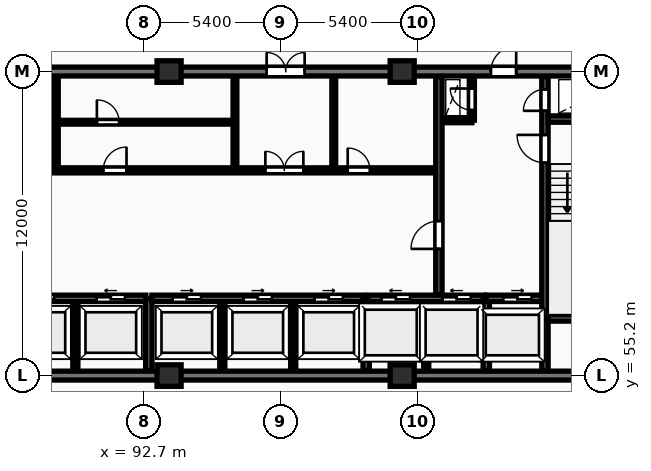
"""IFC4 building model, lengths in metres.
Left out: names, types, materials, properties, quantities, classifications, styles, units other than length and angle.
Written with IfcOpenShell. Run it as: python <this file> out.ifc"""

import sys

from ifc_helpers import new_model, si_unit, direction, frame, frame_2d, origin, origin_2d, place, context, subcontext, project, spatial, rectangle, extrude, element, fill, save


model = new_model("IFC4")
c1 = context("Model", 3, precision=1e-05, world=origin(), true_north=direction((0.0, 1.0)))
c2 = subcontext(c1, "Body", "Model", "MODEL_VIEW")
j1 = project(units=[si_unit("LENGTHUNIT", "METRE"), si_unit("PLANEANGLEUNIT", "RADIAN")], contexts=[c1])
p1 = place(None, origin())
s1 = spatial("IfcSite", under=j1, at=p1, CompositionType="ELEMENT")
p2 = place(p1, origin())
s2 = spatial("IfcBuilding", under=s1, at=p2, CompositionType="ELEMENT")
p3 = place(p2, frame((0.0, 0.0, 93.8)))
s3 = spatial("IfcBuildingStorey", under=s2, at=p3, CompositionType="ELEMENT", Elevation=93.8)
for number, where, z_axis, x_axis in (
    (1, (93.7, 55.2, 0.0), (0.0, 0.0, 1.0), (1.0, 0.0, 0.0)),
    (2, (93.7, 67.2, 0.0), (0.0, 0.0, 1.0), (1.0, 0.0, 0.0)),
    (3, (102.9, 55.2, 0.0), (0.0, 0.0, 1.0), (1.0, 0.0, 0.0)),
    (4, (102.9, 67.2, 0.0), (0.0, 0.0, 1.0), (1.0, 0.0, 0.0)),
):
    element("IfcColumn", number, at=place(p3, frame(where, z_axis=z_axis, x_axis=x_axis)), inside=s3, PredefinedType="COLUMN", context=c2, shape_type="SweptSolid", body=[
        extrude(rectangle(XDim=0.95, YDim=0.85, at=origin_2d()), origin(), (0.0, 0.0, 1.0), 3.25),
    ])
p4 = place(p3, frame((75.95, 55.2, 0.0), z_axis=(0.0, 0.0, 1.0), x_axis=(1.0, 0.0, 0.0)))
e5 = element("IfcWall", 5, at=p4, inside=s3, PredefinedType="SHEAR", context=c2, shape_type="SweptSolid", body=[
    extrude(rectangle(XDim=36.3, YDim=0.35, at=frame_2d((18.15, 0.0))), origin(), (0.0, 0.0, 1.0), 3.25),
])
p5 = place(p3, frame((75.95, 67.2, 0.0), z_axis=(0.0, 0.0, 1.0), x_axis=(1.0, 0.0, 0.0)))
e6 = element("IfcWall", 6, at=p5, inside=s3, PredefinedType="SHEAR", context=c2, shape_type="SweptSolid", body=[
    extrude(rectangle(XDim=36.3, YDim=0.35, at=frame_2d((18.15, 0.0))), origin(), (0.0, 0.0, 1.0), 3.25),
])
p6 = place(p5, frame((5.25, 0.0, 0.0)))
e7 = element("IfcOpeningElement", 7, at=p6, cuts=e6, PredefinedType="OPENING", context=c2, shape_type="SweptSolid", body=[
    extrude(rectangle(XDim=1.0, YDim=2.15, at=frame_2d((0.5, 1.075))), frame((0.0, 0.185, 0.0), z_axis=(0.0, -1.0, 0.0), x_axis=(1.0, 0.0, 0.0)), (0.0, 0.0, 1.0), 0.37),
])
p7 = place(p5, frame((21.6, 0.0, 0.0)))
e8 = element("IfcOpeningElement", 8, at=p7, cuts=e6, PredefinedType="OPENING", context=c2, shape_type="SweptSolid", body=[
    extrude(rectangle(XDim=1.5, YDim=2.2, at=frame_2d((0.75, 1.1))), frame((0.0, 0.185, 0.0), z_axis=(0.0, -1.0, 0.0), x_axis=(1.0, 0.0, 0.0)), (0.0, 0.0, 1.0), 0.37),
])
p8 = place(p5, frame((30.45, 0.0, 0.0)))
e9 = element("IfcOpeningElement", 9, at=p8, cuts=e6, PredefinedType="OPENING", context=c2, shape_type="SweptSolid", body=[
    extrude(rectangle(XDim=1.0, YDim=2.15, at=frame_2d((0.5, 1.075))), frame((0.0, 0.185, 0.0), z_axis=(0.0, -1.0, 0.0), x_axis=(1.0, 0.0, 0.0)), (0.0, 0.0, 1.0), 0.37),
])
p9 = place(p3, frame((90.0, 55.4, 0.0), z_axis=(0.0, 0.0, 1.0), x_axis=(0.0, 1.0, 0.0)))
e10 = element("IfcWall", 10, at=p9, inside=s3, PredefinedType="PARTITIONING", context=c2, shape_type="SweptSolid", body=[
    extrude(rectangle(XDim=2.72, YDim=0.2, at=frame_2d((1.36, 0.0))), origin(), (0.0, 0.0, 1.0), 2.97),
])
p10 = place(p3, frame((84.42, 58.25, 0.0), z_axis=(0.0, 0.0, 1.0), x_axis=(1.0, 0.0, 0.0)))
e11 = element("IfcWall", 11, at=p10, inside=s3, PredefinedType="SHEAR", context=c2, shape_type="SweptSolid", body=[
    extrude(rectangle(XDim=8.36, YDim=0.25, at=frame_2d((4.18, 0.0))), origin(), (0.0, 0.0, 1.0), 3.25),
])
p11 = place(p10, frame((0.82, 0.0, 0.0)))
e12 = element("IfcOpeningElement", 12, at=p11, cuts=e11, PredefinedType="OPENING", context=c2, shape_type="SweptSolid", body=[
    extrude(rectangle(XDim=1.12, YDim=2.12, at=frame_2d((0.56, 1.06))), frame((0.0, 0.135, 0.0), z_axis=(0.0, -1.0, 0.0), x_axis=(1.0, 0.0, 0.0)), (0.0, 0.0, 1.0), 0.27),
])
p12 = place(p10, frame((3.62, 0.0, 0.0)))
e13 = element("IfcOpeningElement", 13, at=p12, cuts=e11, PredefinedType="OPENING", context=c2, shape_type="SweptSolid", body=[
    extrude(rectangle(XDim=1.12, YDim=2.12, at=frame_2d((0.56, 1.06))), frame((0.0, 0.135, 0.0), z_axis=(0.0, -1.0, 0.0), x_axis=(1.0, 0.0, 0.0)), (0.0, 0.0, 1.0), 0.27),
])
p13 = place(p10, frame((6.42, 0.0, 0.0)))
e14 = element("IfcOpeningElement", 14, at=p13, cuts=e11, PredefinedType="OPENING", context=c2, shape_type="SweptSolid", body=[
    extrude(rectangle(XDim=1.12, YDim=2.12, at=frame_2d((0.56, 1.06))), frame((0.0, 0.135, 0.0), z_axis=(0.0, -1.0, 0.0), x_axis=(1.0, 0.0, 0.0)), (0.0, 0.0, 1.0), 0.27),
])
p14 = place(p3, frame((92.9, 55.4, 0.0), z_axis=(0.0, 0.0, 1.0), x_axis=(0.0, 1.0, 0.0)))
e15 = element("IfcWall", 15, at=p14, inside=s3, PredefinedType="SHEAR", context=c2, shape_type="SweptSolid", body=[
    extrude(rectangle(XDim=2.85, YDim=0.25, at=frame_2d((1.425, 0.0))), origin(), (0.0, 0.0, 1.0), 3.25),
])
for number, where, z_axis, x_axis in (
    (16, (95.8, 55.4, 0.0), (0.0, 0.0, 1.0), (0.0, 1.0, 0.0)),
    (17, (98.6, 55.4, 0.0), (0.0, 0.0, 1.0), (0.0, 1.0, 0.0)),
):
    element("IfcWall", number, at=place(p3, frame(where, z_axis=z_axis, x_axis=x_axis)), inside=s3, PredefinedType="PARTITIONING", context=c2, shape_type="SweptSolid", body=[
        extrude(rectangle(XDim=2.72, YDim=0.2, at=frame_2d((1.36, 0.0))), origin(), (0.0, 0.0, 1.0), 2.97),
    ])
p15 = place(p3, frame((93.02, 58.25, 0.0), z_axis=(0.0, 0.0, 1.0), x_axis=(1.0, 0.0, 0.0)))
e18 = element("IfcWall", 18, at=p15, inside=s3, PredefinedType="SHEAR", context=c2, shape_type="SweptSolid", body=[
    extrude(rectangle(XDim=8.36, YDim=0.25, at=frame_2d((4.18, 0.0))), origin(), (0.0, 0.0, 1.0), 3.25),
])
p16 = place(p15, frame((0.82, 0.0, 0.0)))
e19 = element("IfcOpeningElement", 19, at=p16, cuts=e18, PredefinedType="OPENING", context=c2, shape_type="SweptSolid", body=[
    extrude(rectangle(XDim=1.12, YDim=2.12, at=frame_2d((0.56, 1.06))), frame((0.0, 0.135, 0.0), z_axis=(0.0, -1.0, 0.0), x_axis=(1.0, 0.0, 0.0)), (0.0, 0.0, 1.0), 0.27),
])
p17 = place(p15, frame((3.62, 0.0, 0.0)))
e20 = element("IfcOpeningElement", 20, at=p17, cuts=e18, PredefinedType="OPENING", context=c2, shape_type="SweptSolid", body=[
    extrude(rectangle(XDim=1.12, YDim=2.12, at=frame_2d((0.56, 1.06))), frame((0.0, 0.135, 0.0), z_axis=(0.0, -1.0, 0.0), x_axis=(1.0, 0.0, 0.0)), (0.0, 0.0, 1.0), 0.27),
])
p18 = place(p15, frame((6.42, 0.0, 0.0)))
e21 = element("IfcOpeningElement", 21, at=p18, cuts=e18, PredefinedType="OPENING", context=c2, shape_type="SweptSolid", body=[
    extrude(rectangle(XDim=1.12, YDim=2.12, at=frame_2d((0.56, 1.06))), frame((0.0, 0.135, 0.0), z_axis=(0.0, -1.0, 0.0), x_axis=(1.0, 0.0, 0.0)), (0.0, 0.0, 1.0), 0.27),
])
p19 = place(p3, frame((101.48, 55.4, 0.0), z_axis=(0.0, 0.0, 1.0), x_axis=(0.0, 1.0, 0.0)))
e22 = element("IfcWall", 22, at=p19, inside=s3, PredefinedType="SHEAR", context=c2, shape_type="SweptSolid", body=[
    extrude(rectangle(XDim=2.85, YDim=0.25, at=frame_2d((1.425, 0.0))), origin(), (0.0, 0.0, 1.0), 3.25),
])
p20 = place(p3, frame((103.85, 55.4, 0.0), z_axis=(0.0, 0.0, 1.0), x_axis=(0.0, 1.0, 0.0)))
e23 = element("IfcWall", 23, at=p20, inside=s3, PredefinedType="PARTITIONING", context=c2, shape_type="SweptSolid", body=[
    extrude(rectangle(XDim=2.72, YDim=0.2, at=frame_2d((1.36, 0.0))), origin(), (0.0, 0.0, 1.0), 2.97),
])
p21 = place(p3, frame((101.55, 58.25, 0.0), z_axis=(0.0, 0.0, 1.0), x_axis=(1.0, 0.0, 0.0)))
e24 = element("IfcWall", 24, at=p21, inside=s3, PredefinedType="SHEAR", context=c2, shape_type="SweptSolid", body=[
    extrude(rectangle(XDim=4.6, YDim=0.25, at=frame_2d((2.3, 0.0))), origin(), (0.0, 0.0, 1.0), 3.25),
])
p22 = place(p21, frame((0.54, 0.0, 0.0)))
e25 = element("IfcOpeningElement", 25, at=p22, cuts=e24, PredefinedType="OPENING", context=c2, shape_type="SweptSolid", body=[
    extrude(rectangle(XDim=1.12, YDim=2.12, at=frame_2d((0.56, 1.06))), frame((0.0, 0.135, 0.0), z_axis=(0.0, -1.0, 0.0), x_axis=(1.0, 0.0, 0.0)), (0.0, 0.0, 1.0), 0.27),
])
p23 = place(p21, frame((2.94, 0.0, 0.0)))
e26 = element("IfcOpeningElement", 26, at=p23, cuts=e24, PredefinedType="OPENING", context=c2, shape_type="SweptSolid", body=[
    extrude(rectangle(XDim=1.12, YDim=2.12, at=frame_2d((0.56, 1.06))), frame((0.0, 0.135, 0.0), z_axis=(0.0, -1.0, 0.0), x_axis=(1.0, 0.0, 0.0)), (0.0, 0.0, 1.0), 0.27),
])
p24 = place(p3, frame((106.22, 55.4, 0.0), z_axis=(0.0, 0.0, 1.0), x_axis=(0.0, 1.0, 0.0)))
e27 = element("IfcWall", 27, at=p24, inside=s3, PredefinedType="SHEAR", context=c2, shape_type="SweptSolid", body=[
    extrude(rectangle(XDim=2.85, YDim=0.25, at=frame_2d((1.425, 0.0))), origin(), (0.0, 0.0, 1.0), 3.25),
])
p25 = place(p3, frame((106.22, 58.25, 0.0), z_axis=(0.0, 0.0, 1.0), x_axis=(1.0, 0.0, 0.0)))
e28 = element("IfcWall", 28, at=p25, inside=s3, PredefinedType="SHEAR", context=c2, shape_type="SweptSolid", body=[
    extrude(rectangle(XDim=2.46, YDim=0.25, at=frame_2d((1.23, 0.0))), origin(), (0.0, 0.0, 1.0), 3.25),
])
p26 = place(p25, frame((0.67, 0.0, 0.0)))
e29 = element("IfcOpeningElement", 29, at=p26, cuts=e28, PredefinedType="OPENING", context=c2, shape_type="SweptSolid", body=[
    extrude(rectangle(XDim=1.12, YDim=2.12, at=frame_2d((0.56, 1.06))), frame((0.0, 0.135, 0.0), z_axis=(0.0, -1.0, 0.0), x_axis=(1.0, 0.0, 0.0)), (0.0, 0.0, 1.0), 0.27),
])
p27 = place(p3, frame((89.25, 63.4, 0.0), z_axis=(0.0, 0.0, 1.0), x_axis=(0.0, 1.0, 0.0)))
e30 = element("IfcWall", 30, at=p27, inside=s3, PredefinedType="PARTITIONING", context=c2, shape_type="SweptSolid", body=[
    extrude(rectangle(XDim=3.6, YDim=0.15, at=frame_2d((1.8, 0.0))), origin(), (0.0, 0.0, 1.0), 2.97),
])
p28 = place(p3, frame((89.25, 65.2, 0.0), z_axis=(0.0, 0.0, 1.0), x_axis=(1.0, 0.0, 0.0)))
e31 = element("IfcWall", 31, at=p28, inside=s3, PredefinedType="PARTITIONING", context=c2, shape_type="SweptSolid", body=[
    extrude(rectangle(XDim=7.05, YDim=0.15, at=frame_2d((3.525, 0.0))), origin(), (0.0, 0.0, 1.0), 2.97),
])
p29 = place(p28, frame((1.6, 0.0, 0.0)))
e32 = element("IfcOpeningElement", 32, at=p29, cuts=e31, PredefinedType="OPENING", context=c2, shape_type="SweptSolid", body=[
    extrude(rectangle(XDim=0.88, YDim=2.06, at=frame_2d((0.44, 1.03))), frame((0.0, 0.085, 0.0), z_axis=(0.0, -1.0, 0.0), x_axis=(1.0, 0.0, 0.0)), (0.0, 0.0, 1.0), 0.17),
])
for number, where, z_axis, x_axis in (
    (33, (96.3, 63.4, 0.0), (0.0, 0.0, 1.0), (0.0, 1.0, 0.0)),
    (34, (100.2, 63.4, 0.0), (0.0, 0.0, 1.0), (0.0, 1.0, 0.0)),
):
    element("IfcWall", number, at=place(p3, frame(where, z_axis=z_axis, x_axis=x_axis)), inside=s3, PredefinedType="PARTITIONING", context=c2, shape_type="SweptSolid", body=[
        extrude(rectangle(XDim=3.6, YDim=0.15, at=frame_2d((1.8, 0.0))), origin(), (0.0, 0.0, 1.0), 2.97),
    ])
p30 = place(p3, frame((84.42, 63.3, 0.0), z_axis=(0.0, 0.0, 1.0), x_axis=(1.0, 0.0, 0.0)))
e35 = element("IfcWall", 35, at=p30, inside=s3, PredefinedType="PARTITIONING", context=c2, shape_type="SweptSolid", body=[
    extrude(rectangle(XDim=19.83, YDim=0.2, at=frame_2d((9.915, 0.0))), origin(), (0.0, 0.0, 1.0), 2.97),
])
p31 = place(p30, frame((1.15, 0.0, 0.0)))
e36 = element("IfcOpeningElement", 36, at=p31, cuts=e35, PredefinedType="OPENING", context=c2, shape_type="SweptSolid", body=[
    extrude(rectangle(XDim=0.85, YDim=2.05, at=frame_2d((0.425, 1.025))), frame((0.0, 0.11, 0.0), z_axis=(0.0, -1.0, 0.0), x_axis=(1.0, 0.0, 0.0)), (0.0, 0.0, 1.0), 0.22),
])
p32 = place(p30, frame((3.25, 0.0, 0.0)))
e37 = element("IfcOpeningElement", 37, at=p32, cuts=e35, PredefinedType="OPENING", context=c2, shape_type="SweptSolid", body=[
    extrude(rectangle(XDim=0.85, YDim=2.05, at=frame_2d((0.425, 1.025))), frame((0.0, 0.11, 0.0), z_axis=(0.0, -1.0, 0.0), x_axis=(1.0, 0.0, 0.0)), (0.0, 0.0, 1.0), 0.22),
])
p33 = place(p30, frame((13.08, 0.0, 0.0)))
e38 = element("IfcOpeningElement", 38, at=p33, cuts=e35, PredefinedType="OPENING", context=c2, shape_type="SweptSolid", body=[
    extrude(rectangle(XDim=1.5, YDim=2.2, at=frame_2d((0.75, 1.1))), frame((0.0, 0.11, 0.0), z_axis=(0.0, -1.0, 0.0), x_axis=(1.0, 0.0, 0.0)), (0.0, 0.0, 1.0), 0.22),
])
p34 = place(p30, frame((6.68, 0.0, 0.0)))
e39 = element("IfcOpeningElement", 39, at=p34, cuts=e35, PredefinedType="OPENING", context=c2, shape_type="SweptSolid", body=[
    extrude(rectangle(XDim=0.92, YDim=2.08, at=frame_2d((0.46, 1.04))), frame((0.0, 0.11, 0.0), z_axis=(0.0, -1.0, 0.0), x_axis=(1.0, 0.0, 0.0)), (0.0, 0.0, 1.0), 0.22),
])
p35 = place(p30, frame((16.33, 0.0, 0.0)))
e40 = element("IfcOpeningElement", 40, at=p35, cuts=e35, PredefinedType="OPENING", context=c2, shape_type="SweptSolid", body=[
    extrude(rectangle(XDim=0.88, YDim=2.06, at=frame_2d((0.44, 1.03))), frame((0.0, 0.11, 0.0), z_axis=(0.0, -1.0, 0.0), x_axis=(1.0, 0.0, 0.0)), (0.0, 0.0, 1.0), 0.22),
])
p36 = place(p3, frame((104.45, 65.28, 0.0), z_axis=(0.0, 0.0, 1.0), x_axis=(1.0, 0.0, 0.0)))
e41 = element("IfcWall", 41, at=p36, inside=s3, PredefinedType="PARTITIONING", context=c2, shape_type="SweptSolid", body=[
    extrude(rectangle(XDim=1.2, YDim=0.2, at=frame_2d((0.6, 0.0))), origin(), (0.0, 0.0, 1.0), 2.97),
])
p37 = place(p3, frame((105.65, 65.28, 0.0), z_axis=(0.0, 0.0, 1.0), x_axis=(0.0, 1.0, 0.0)))
e42 = element("IfcWall", 42, at=p37, inside=s3, PredefinedType="PARTITIONING", context=c2, shape_type="SweptSolid", body=[
    extrude(rectangle(XDim=1.72, YDim=0.2, at=frame_2d((0.86, 0.0))), origin(), (0.0, 0.0, 1.0), 2.97),
])
p38 = place(p37, frame((0.4, 0.0, 0.0)))
e43 = element("IfcOpeningElement", 43, at=p38, cuts=e42, PredefinedType="OPENING", context=c2, shape_type="SweptSolid", body=[
    extrude(rectangle(XDim=0.85, YDim=2.05, at=frame_2d((0.425, 1.025))), frame((0.0, 0.11, 0.0), z_axis=(0.0, -1.0, 0.0), x_axis=(1.0, 0.0, 0.0)), (0.0, 0.0, 1.0), 0.22),
])
p39 = place(p3, frame((104.35, 58.4, 0.0), z_axis=(0.0, 0.0, 1.0), x_axis=(0.0, 1.0, 0.0)))
e44 = element("IfcWall", 44, at=p39, inside=s3, PredefinedType="SHEAR", context=c2, shape_type="SweptSolid", body=[
    extrude(rectangle(XDim=8.6, YDim=0.25, at=frame_2d((4.3, 0.0))), origin(), (0.0, 0.0, 1.0), 3.25),
])
p40 = place(p39, frame((1.8, 0.0, 0.0)))
e45 = element("IfcOpeningElement", 45, at=p40, cuts=e44, PredefinedType="OPENING", context=c2, shape_type="SweptSolid", body=[
    extrude(rectangle(XDim=1.1, YDim=2.1, at=frame_2d((0.55, 1.05))), frame((0.0, 0.135, 0.0), z_axis=(0.0, -1.0, 0.0), x_axis=(1.0, 0.0, 0.0)), (0.0, 0.0, 1.0), 0.27),
])
p41 = place(p3, frame((108.535, 55.4, 0.0), z_axis=(0.0, 0.0, 1.0), x_axis=(0.0, 1.0, 0.0)))
e46 = element("IfcWall", 46, at=p41, inside=s3, PredefinedType="SHEAR", context=c2, shape_type="SweptSolid", body=[
    extrude(rectangle(XDim=11.6, YDim=0.25, at=frame_2d((5.8, 0.0))), origin(), (0.0, 0.0, 1.0), 3.25),
])
p42 = place(p41, frame((8.2, 0.0, 0.0)))
e47 = element("IfcOpeningElement", 47, at=p42, cuts=e46, PredefinedType="OPENING", context=c2, shape_type="SweptSolid", body=[
    extrude(rectangle(XDim=1.1, YDim=2.1, at=frame_2d((0.55, 1.05))), frame((0.0, 0.135, 0.0), z_axis=(0.0, -1.0, 0.0), x_axis=(1.0, 0.0, 0.0)), (0.0, 0.0, 1.0), 0.27),
])
p43 = place(p41, frame((10.25, 0.0, 0.0)))
e48 = element("IfcOpeningElement", 48, at=p43, cuts=e46, PredefinedType="OPENING", context=c2, shape_type="SweptSolid", body=[
    extrude(rectangle(XDim=0.85, YDim=2.05, at=frame_2d((0.425, 1.025))), frame((0.0, 0.135, 0.0), z_axis=(0.0, -1.0, 0.0), x_axis=(1.0, 0.0, 0.0)), (0.0, 0.0, 1.0), 0.27),
])
for number, where, z_axis, x_axis in (
    (49, (108.66, 57.475, 0.0), (0.0, 0.0, 1.0), (1.0, 0.0, 0.0)),
    (50, (108.66, 65.325, 0.0), (0.0, 0.0, 1.0), (1.0, 0.0, 0.0)),
):
    element("IfcWall", number, at=place(p3, frame(where, z_axis=z_axis, x_axis=x_axis)), inside=s3, PredefinedType="SHEAR", context=c2, shape_type="SweptSolid", body=[
        extrude(rectangle(XDim=3.24, YDim=0.25, at=frame_2d((1.62, 0.0))), origin(), (0.0, 0.0, 1.0), 3.25),
    ])
p44 = place(p7, origin())
e51 = element("IfcDoor", 51, at=p44, inside=s3, OperationType="DOUBLE_DOOR_SINGLE_SWING", PredefinedType="DOOR", context=c2, shape_type="SweptSolid", body=[
    extrude(rectangle(XDim=1.5, YDim=2.2, at=frame_2d((0.75, 1.1))), frame((0.0, 0.025, 0.0), z_axis=(0.0, -1.0, 0.0), x_axis=(1.0, 0.0, 0.0)), (0.0, 0.0, 1.0), 0.05),
])
fill(e8, e51)
p45 = place(p8, origin())
e52 = element("IfcDoor", 52, at=p45, inside=s3, OperationType="SINGLE_SWING_RIGHT", PredefinedType="DOOR", context=c2, shape_type="SweptSolid", body=[
    extrude(rectangle(XDim=1.0, YDim=2.15, at=frame_2d((0.5, 1.075))), frame((0.0, 0.025, 0.0), z_axis=(0.0, -1.0, 0.0), x_axis=(1.0, 0.0, 0.0)), (0.0, 0.0, 1.0), 0.05),
])
fill(e9, e52)
p46 = place(p12, origin())
e53 = element("IfcDoor", 53, at=p46, inside=s3, OperationType="SLIDING_TO_LEFT", PredefinedType="DOOR", context=c2, shape_type="SweptSolid", body=[
    extrude(rectangle(XDim=1.12, YDim=2.12, at=frame_2d((0.56, 1.06))), frame((0.0, 0.025, 0.0), z_axis=(0.0, -1.0, 0.0), x_axis=(1.0, 0.0, 0.0)), (0.0, 0.0, 1.0), 0.05),
])
fill(e13, e53)
p47 = place(p13, origin())
e54 = element("IfcDoor", 54, at=p47, inside=s3, OperationType="SLIDING_TO_LEFT", PredefinedType="DOOR", context=c2, shape_type="SweptSolid", body=[
    extrude(rectangle(XDim=1.12, YDim=2.12, at=frame_2d((0.56, 1.06))), frame((0.0, 0.025, 0.0), z_axis=(0.0, -1.0, 0.0), x_axis=(1.0, 0.0, 0.0)), (0.0, 0.0, 1.0), 0.05),
])
fill(e14, e54)
p48 = place(p16, origin())
e55 = element("IfcDoor", 55, at=p48, inside=s3, OperationType="SLIDING_TO_RIGHT", PredefinedType="DOOR", context=c2, shape_type="SweptSolid", body=[
    extrude(rectangle(XDim=1.12, YDim=2.12, at=frame_2d((0.56, 1.06))), frame((0.0, 0.025, 0.0), z_axis=(0.0, -1.0, 0.0), x_axis=(1.0, 0.0, 0.0)), (0.0, 0.0, 1.0), 0.05),
])
fill(e19, e55)
p49 = place(p17, origin())
e56 = element("IfcDoor", 56, at=p49, inside=s3, OperationType="SLIDING_TO_RIGHT", PredefinedType="DOOR", context=c2, shape_type="SweptSolid", body=[
    extrude(rectangle(XDim=1.12, YDim=2.12, at=frame_2d((0.56, 1.06))), frame((0.0, 0.025, 0.0), z_axis=(0.0, -1.0, 0.0), x_axis=(1.0, 0.0, 0.0)), (0.0, 0.0, 1.0), 0.05),
])
fill(e20, e56)
p50 = place(p18, origin())
e57 = element("IfcDoor", 57, at=p50, inside=s3, OperationType="SLIDING_TO_RIGHT", PredefinedType="DOOR", context=c2, shape_type="SweptSolid", body=[
    extrude(rectangle(XDim=1.12, YDim=2.12, at=frame_2d((0.56, 1.06))), frame((0.0, 0.025, 0.0), z_axis=(0.0, -1.0, 0.0), x_axis=(1.0, 0.0, 0.0)), (0.0, 0.0, 1.0), 0.05),
])
fill(e21, e57)
p51 = place(p22, origin())
e58 = element("IfcDoor", 58, at=p51, inside=s3, OperationType="SLIDING_TO_LEFT", PredefinedType="DOOR", context=c2, shape_type="SweptSolid", body=[
    extrude(rectangle(XDim=1.12, YDim=2.12, at=frame_2d((0.56, 1.06))), frame((0.0, 0.025, 0.0), z_axis=(0.0, -1.0, 0.0), x_axis=(1.0, 0.0, 0.0)), (0.0, 0.0, 1.0), 0.05),
])
fill(e25, e58)
p52 = place(p23, origin())
e59 = element("IfcDoor", 59, at=p52, inside=s3, OperationType="SLIDING_TO_LEFT", PredefinedType="DOOR", context=c2, shape_type="SweptSolid", body=[
    extrude(rectangle(XDim=1.12, YDim=2.12, at=frame_2d((0.56, 1.06))), frame((0.0, 0.025, 0.0), z_axis=(0.0, -1.0, 0.0), x_axis=(1.0, 0.0, 0.0)), (0.0, 0.0, 1.0), 0.05),
])
fill(e26, e59)
p53 = place(p26, origin())
e60 = element("IfcDoor", 60, at=p53, inside=s3, OperationType="SLIDING_TO_RIGHT", PredefinedType="DOOR", context=c2, shape_type="SweptSolid", body=[
    extrude(rectangle(XDim=1.12, YDim=2.12, at=frame_2d((0.56, 1.06))), frame((0.0, 0.025, 0.0), z_axis=(0.0, -1.0, 0.0), x_axis=(1.0, 0.0, 0.0)), (0.0, 0.0, 1.0), 0.05),
])
fill(e29, e60)
p54 = place(p29, origin())
e61 = element("IfcDoor", 61, at=p54, inside=s3, OperationType="SINGLE_SWING_LEFT", PredefinedType="DOOR", context=c2, shape_type="SweptSolid", body=[
    extrude(rectangle(XDim=0.88, YDim=2.06, at=frame_2d((0.44, 1.03))), frame((0.0, 0.025, 0.0), z_axis=(0.0, -1.0, 0.0), x_axis=(1.0, 0.0, 0.0)), (0.0, 0.0, 1.0), 0.05),
])
fill(e32, e61)
p55 = place(p33, origin())
e62 = element("IfcDoor", 62, at=p55, inside=s3, OperationType="DOUBLE_DOOR_SINGLE_SWING", PredefinedType="DOOR", context=c2, shape_type="SweptSolid", body=[
    extrude(rectangle(XDim=1.5, YDim=2.2, at=frame_2d((0.75, 1.1))), frame((0.0, 0.025, 0.0), z_axis=(0.0, -1.0, 0.0), x_axis=(1.0, 0.0, 0.0)), (0.0, 0.0, 1.0), 0.05),
])
fill(e38, e62)
p56 = place(p34, origin())
e63 = element("IfcDoor", 63, at=p56, inside=s3, OperationType="SINGLE_SWING_RIGHT", PredefinedType="DOOR", context=c2, shape_type="SweptSolid", body=[
    extrude(rectangle(XDim=0.92, YDim=2.08, at=frame_2d((0.46, 1.04))), frame((0.0, 0.025, 0.0), z_axis=(0.0, -1.0, 0.0), x_axis=(1.0, 0.0, 0.0)), (0.0, 0.0, 1.0), 0.05),
])
fill(e39, e63)
p57 = place(p35, origin())
e64 = element("IfcDoor", 64, at=p57, inside=s3, OperationType="SINGLE_SWING_LEFT", PredefinedType="DOOR", context=c2, shape_type="SweptSolid", body=[
    extrude(rectangle(XDim=0.88, YDim=2.06, at=frame_2d((0.44, 1.03))), frame((0.0, 0.025, 0.0), z_axis=(0.0, -1.0, 0.0), x_axis=(1.0, 0.0, 0.0)), (0.0, 0.0, 1.0), 0.05),
])
fill(e40, e64)
p58 = place(p38, origin())
e65 = element("IfcDoor", 65, at=p58, inside=s3, OperationType="SINGLE_SWING_RIGHT", PredefinedType="DOOR", context=c2, shape_type="SweptSolid", body=[
    extrude(rectangle(XDim=0.85, YDim=2.05, at=frame_2d((0.425, 1.025))), frame((0.0, 0.025, 0.0), z_axis=(0.0, -1.0, 0.0), x_axis=(1.0, 0.0, 0.0)), (0.0, 0.0, 1.0), 0.05),
])
fill(e43, e65)
p59 = place(p40, origin())
e66 = element("IfcDoor", 66, at=p59, inside=s3, OperationType="SINGLE_SWING_LEFT", PredefinedType="DOOR", context=c2, shape_type="SweptSolid", body=[
    extrude(rectangle(XDim=1.1, YDim=2.1, at=frame_2d((0.55, 1.05))), frame((0.0, 0.025, 0.0), z_axis=(0.0, -1.0, 0.0), x_axis=(1.0, 0.0, 0.0)), (0.0, 0.0, 1.0), 0.05),
])
fill(e45, e66)
p60 = place(p42, origin())
e67 = element("IfcDoor", 67, at=p60, inside=s3, OperationType="SINGLE_SWING_RIGHT", PredefinedType="DOOR", context=c2, shape_type="SweptSolid", body=[
    extrude(rectangle(XDim=1.1, YDim=2.1, at=frame_2d((0.55, 1.05))), frame((0.0, 0.025, 0.0), z_axis=(0.0, -1.0, 0.0), x_axis=(1.0, 0.0, 0.0)), (0.0, 0.0, 1.0), 0.05),
])
fill(e47, e67)
p61 = place(p43, origin())
e68 = element("IfcDoor", 68, at=p61, inside=s3, OperationType="SINGLE_SWING_LEFT", PredefinedType="DOOR", context=c2, shape_type="SweptSolid", body=[
    extrude(rectangle(XDim=0.85, YDim=2.05, at=frame_2d((0.425, 1.025))), frame((0.0, 0.025, 0.0), z_axis=(0.0, -1.0, 0.0), x_axis=(1.0, 0.0, 0.0)), (0.0, 0.0, 1.0), 0.05),
])
fill(e48, e68)
save(model, sys.argv[1])
